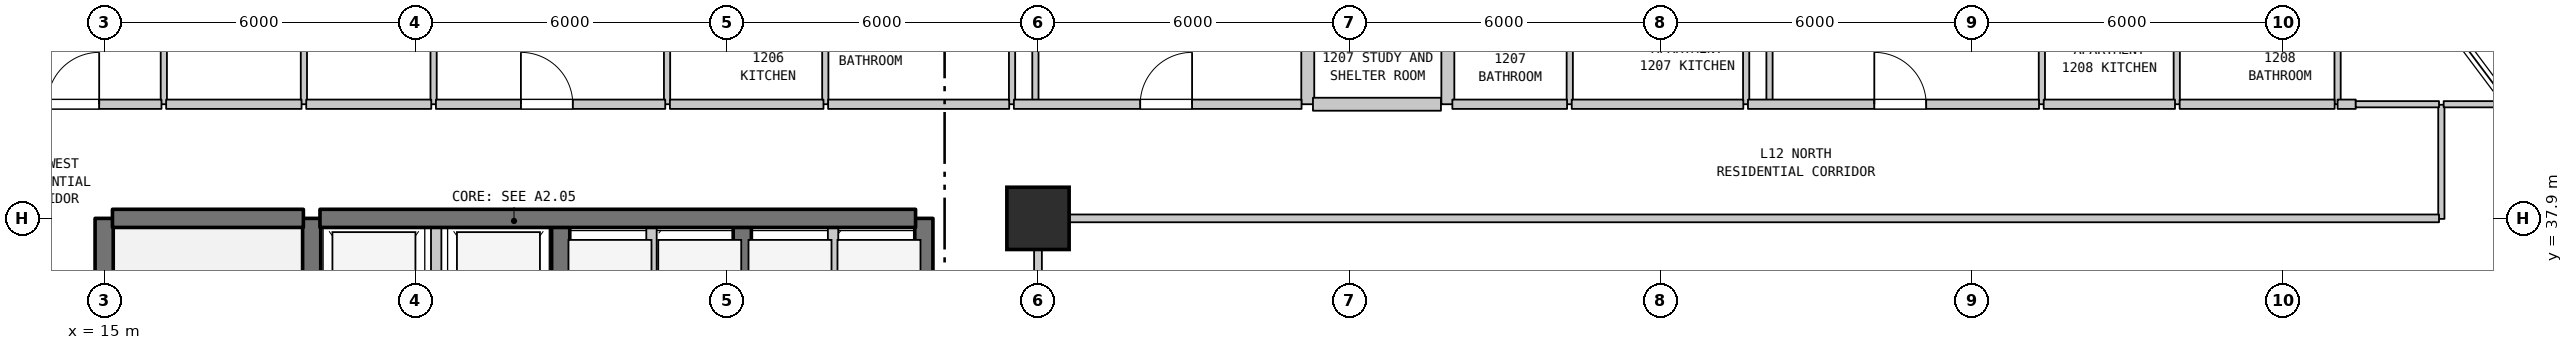
"""IFC4 building model, lengths in metres.
Left out: names, types, materials, properties, quantities, classifications, styles, units other than length and angle.
Written with IfcOpenShell. Run it as: python <this file> out.ifc"""

import sys

from ifc_helpers import new_model, si_unit, direction, frame, frame_2d, origin, origin_2d, place, context, subcontext, project, spatial, rectangle, extrude, element, fill, save


model = new_model("IFC4")
c1 = context("Model", 3, precision=1e-05, world=origin(), true_north=direction((0.0, 1.0)))
c2 = subcontext(c1, "Body", "Model", "MODEL_VIEW")
j1 = project(units=[si_unit("LENGTHUNIT", "METRE"), si_unit("PLANEANGLEUNIT", "RADIAN")], contexts=[c1])
p1 = place(None, origin())
s1 = spatial("IfcSite", under=j1, at=p1, CompositionType="ELEMENT")
p2 = place(p1, origin())
s2 = spatial("IfcBuilding", under=s1, at=p2, CompositionType="ELEMENT")
p3 = place(p2, frame((0.0, 0.0, 53.6)))
s3 = spatial("IfcBuildingStorey", under=s2, at=p3, CompositionType="ELEMENT", Elevation=53.6)
p4 = place(p3, frame((33.0, 37.9, 0.0), z_axis=(0.0, 0.0, 1.0), x_axis=(1.0, 0.0, 0.0)))
e1 = element("IfcColumn", 1, at=p4, inside=s3, PredefinedType="COLUMN", context=c2, shape_type="SweptSolid", body=[
    extrude(rectangle(XDim=1.2, YDim=1.2, at=origin_2d()), origin(), (0.0, 0.0, 1.0), 3.7),
])
p5 = place(p3, frame((15.0, 31.1, 0.0), z_axis=(0.0, 0.0, 1.0), x_axis=(0.0, 1.0, 0.0)))
e2 = element("IfcWall", 2, at=p5, inside=s3, PredefinedType="SHEAR", context=c2, shape_type="SweptSolid", body=[
    extrude(rectangle(XDim=6.8, YDim=0.35, at=frame_2d((3.4, 0.0))), origin(), (0.0, 0.0, 1.0), 3.385),
])
p6 = place(p3, frame((16.15, 40.1, 0.0), z_axis=(0.0, 0.0, 1.0), x_axis=(0.0, 1.0, 0.0)))
e3 = element("IfcWall", 3, at=p6, inside=s3, PredefinedType="PARTITIONING", context=c2, shape_type="SweptSolid", body=[
    extrude(rectangle(XDim=3.2, YDim=0.12, at=frame_2d((1.6, 0.0))), origin(), (0.0, 0.0, 1.0), 3.385),
])
p7 = place(p3, frame((18.85, 40.1, 0.0), z_axis=(0.0, 0.0, 1.0), x_axis=(0.0, 1.0, 0.0)))
e4 = element("IfcWall", 4, at=p7, inside=s3, PredefinedType="PARTITIONING", context=c2, shape_type="SweptSolid", body=[
    extrude(rectangle(XDim=3.2, YDim=0.12, at=frame_2d((1.6, 0.0))), origin(), (0.0, 0.0, 1.0), 3.385),
])
p8 = place(p7, frame((1.15, 0.0, 0.0)))
e5 = element("IfcOpeningElement", 5, at=p8, cuts=e4, PredefinedType="OPENING", context=c2, shape_type="SweptSolid", body=[
    extrude(rectangle(XDim=0.9, YDim=2.15, at=frame_2d((0.45, 1.075))), frame((0.0, 0.07, 0.0), z_axis=(0.0, -1.0, 0.0), x_axis=(1.0, 0.0, 0.0)), (0.0, 0.0, 1.0), 0.14),
])
p9 = place(p3, frame((19.0, 35.0, 0.0), z_axis=(0.0, 0.0, 1.0), x_axis=(0.0, 1.0, 0.0)))
e6 = element("IfcWall", 6, at=p9, inside=s3, PredefinedType="SHEAR", context=c2, shape_type="SweptSolid", body=[
    extrude(rectangle(XDim=2.9, YDim=0.35, at=frame_2d((1.45, 0.0))), origin(), (0.0, 0.0, 1.0), 3.385),
])
p10 = place(p3, frame((21.35, 40.1, 0.0), z_axis=(0.0, 0.0, 1.0), x_axis=(0.0, 1.0, 0.0)))
e7 = element("IfcWall", 7, at=p10, inside=s3, PredefinedType="PARTITIONING", context=c2, shape_type="SweptSolid", body=[
    extrude(rectangle(XDim=13.79, YDim=0.12, at=frame_2d((6.895, 0.0))), origin(), (0.0, 0.0, 1.0), 3.385),
])
p11 = place(p3, frame((21.4, 35.0, 0.0), z_axis=(0.0, 0.0, 1.0), x_axis=(0.0, 1.0, 0.0)))
e8 = element("IfcWall", 8, at=p11, inside=s3, PredefinedType="STANDARD", context=c2, shape_type="SweptSolid", body=[
    extrude(rectangle(XDim=2.9, YDim=0.2, at=frame_2d((1.45, 0.0))), origin(), (0.0, 0.0, 1.0), 3.385),
])
p12 = place(p3, frame((23.8, 35.0, 0.0), z_axis=(0.0, 0.0, 1.0), x_axis=(0.0, 1.0, 0.0)))
e9 = element("IfcWall", 9, at=p12, inside=s3, PredefinedType="SHEAR", context=c2, shape_type="SweptSolid", body=[
    extrude(rectangle(XDim=2.9, YDim=0.35, at=frame_2d((1.45, 0.0))), origin(), (0.0, 0.0, 1.0), 3.385),
])
p13 = place(p3, frame((25.55, 35.0, 0.0), z_axis=(0.0, 0.0, 1.0), x_axis=(0.0, 1.0, 0.0)))
e10 = element("IfcWall", 10, at=p13, inside=s3, PredefinedType="STANDARD", context=c2, shape_type="SweptSolid", body=[
    extrude(rectangle(XDim=2.9, YDim=0.2, at=frame_2d((1.45, 0.0))), origin(), (0.0, 0.0, 1.0), 3.385),
])
p14 = place(p3, frame((25.85, 40.1, 0.0), z_axis=(0.0, 0.0, 1.0), x_axis=(0.0, 1.0, 0.0)))
e11 = element("IfcWall", 11, at=p14, inside=s3, PredefinedType="PARTITIONING", context=c2, shape_type="SweptSolid", body=[
    extrude(rectangle(XDim=2.3, YDim=0.12, at=frame_2d((1.15, 0.0))), origin(), (0.0, 0.0, 1.0), 3.385),
])
p15 = place(p3, frame((27.3, 35.0, 0.0), z_axis=(0.0, 0.0, 1.0), x_axis=(0.0, 1.0, 0.0)))
e12 = element("IfcWall", 12, at=p15, inside=s3, PredefinedType="SHEAR", context=c2, shape_type="SweptSolid", body=[
    extrude(rectangle(XDim=2.9, YDim=0.35, at=frame_2d((1.45, 0.0))), origin(), (0.0, 0.0, 1.0), 3.385),
])
p16 = place(p3, frame((28.9, 40.1, 0.0), z_axis=(0.0, 0.0, 1.0), x_axis=(0.0, 1.0, 0.0)))
e13 = element("IfcWall", 13, at=p16, inside=s3, PredefinedType="PARTITIONING", context=c2, shape_type="SweptSolid", body=[
    extrude(rectangle(XDim=2.3, YDim=0.12, at=frame_2d((1.15, 0.0))), origin(), (0.0, 0.0, 1.0), 3.385),
])
p17 = place(p3, frame((29.05, 35.0, 0.0), z_axis=(0.0, 0.0, 1.0), x_axis=(0.0, 1.0, 0.0)))
e14 = element("IfcWall", 14, at=p17, inside=s3, PredefinedType="STANDARD", context=c2, shape_type="SweptSolid", body=[
    extrude(rectangle(XDim=2.9, YDim=0.2, at=frame_2d((1.45, 0.0))), origin(), (0.0, 0.0, 1.0), 3.385),
])
p18 = place(p3, frame((30.8, 35.0, 0.0), z_axis=(0.0, 0.0, 1.0), x_axis=(0.0, 1.0, 0.0)))
e15 = element("IfcWall", 15, at=p18, inside=s3, PredefinedType="SHEAR", context=c2, shape_type="SweptSolid", body=[
    extrude(rectangle(XDim=2.9, YDim=0.35, at=frame_2d((1.45, 0.0))), origin(), (0.0, 0.0, 1.0), 3.385),
])
p19 = place(p3, frame((32.5, 40.1, 0.0), z_axis=(0.0, 0.0, 1.0), x_axis=(0.0, 1.0, 0.0)))
e16 = element("IfcWall", 16, at=p19, inside=s3, PredefinedType="PARTITIONING", context=c2, shape_type="SweptSolid", body=[
    extrude(rectangle(XDim=2.3, YDim=0.12, at=frame_2d((1.15, 0.0))), origin(), (0.0, 0.0, 1.0), 3.385),
])
p20 = place(p3, frame((32.95, 40.1, 0.0), z_axis=(0.0, 0.0, 1.0), x_axis=(0.0, 1.0, 0.0)))
e17 = element("IfcWall", 17, at=p20, inside=s3, PredefinedType="PARTITIONING", context=c2, shape_type="SweptSolid", body=[
    extrude(rectangle(XDim=2.05, YDim=0.12, at=frame_2d((1.025, 0.0))), origin(), (0.0, 0.0, 1.0), 2.785),
])
p21 = place(p3, frame((33.0, 27.91, 0.0), z_axis=(0.0, 0.0, 1.0), x_axis=(0.0, 1.0, 0.0)))
e18 = element("IfcWall", 18, at=p21, inside=s3, PredefinedType="STANDARD", context=c2, shape_type="SweptSolid", body=[
    extrude(rectangle(XDim=9.98, YDim=0.15, at=frame_2d((4.99, 0.0))), origin(), (0.0, 0.0, 1.0), 2.885),
])
for number, where, z_axis, x_axis in (
    (19, (38.2, 40.1, 0.0), (0.0, 0.0, 1.0), (0.0, 1.0, 0.0)),
    (20, (40.9, 40.1, 0.0), (0.0, 0.0, 1.0), (0.0, 1.0, 0.0)),
):
    element("IfcWall", number, at=place(p3, frame(where, z_axis=z_axis, x_axis=x_axis)), inside=s3, PredefinedType="STANDARD", context=c2, shape_type="SweptSolid", body=[
        extrude(rectangle(XDim=2.3, YDim=0.25, at=frame_2d((1.15, 0.0))), origin(), (0.0, 0.0, 1.0), 3.385),
    ])
for number, where, z_axis, x_axis in (
    (21, (43.25, 40.1, 0.0), (0.0, 0.0, 1.0), (0.0, 1.0, 0.0)),
    (22, (46.65, 40.1, 0.0), (0.0, 0.0, 1.0), (0.0, 1.0, 0.0)),
):
    element("IfcWall", number, at=place(p3, frame(where, z_axis=z_axis, x_axis=x_axis)), inside=s3, PredefinedType="PARTITIONING", context=c2, shape_type="SweptSolid", body=[
        extrude(rectangle(XDim=2.3, YDim=0.12, at=frame_2d((1.15, 0.0))), origin(), (0.0, 0.0, 1.0), 3.385),
    ])
p22 = place(p3, frame((47.1, 40.1, 0.0), z_axis=(0.0, 0.0, 1.0), x_axis=(0.0, 1.0, 0.0)))
e23 = element("IfcWall", 23, at=p22, inside=s3, PredefinedType="PARTITIONING", context=c2, shape_type="SweptSolid", body=[
    extrude(rectangle(XDim=2.05, YDim=0.12, at=frame_2d((1.025, 0.0))), origin(), (0.0, 0.0, 1.0), 3.385),
])
for number, where, z_axis, x_axis in (
    (24, (52.35, 40.1, 0.0), (0.0, 0.0, 1.0), (0.0, 1.0, 0.0)),
    (25, (54.95, 40.1, 0.0), (0.0, 0.0, 1.0), (0.0, 1.0, 0.0)),
    (26, (58.05, 40.1, 0.0), (0.0, 0.0, 1.0), (0.0, 1.0, 0.0)),
):
    element("IfcWall", number, at=place(p3, frame(where, z_axis=z_axis, x_axis=x_axis)), inside=s3, PredefinedType="PARTITIONING", context=c2, shape_type="SweptSolid", body=[
        extrude(rectangle(XDim=2.3, YDim=0.12, at=frame_2d((1.15, 0.0))), origin(), (0.0, 0.0, 1.0), 3.385),
    ])
p23 = place(p3, frame((60.05, 37.89, 0.0), z_axis=(0.0, 0.0, 1.0), x_axis=(0.0, 1.0, 0.0)))
e27 = element("IfcWall", 27, at=p23, inside=s3, PredefinedType="PARTITIONING", context=c2, shape_type="SweptSolid", body=[
    extrude(rectangle(XDim=2.2, YDim=0.12, at=frame_2d((1.1, 0.0))), origin(), (0.0, 0.0, 1.0), 3.385),
])
p24 = place(p3, frame((15.16, 37.9, 0.0), z_axis=(0.0, 0.0, 1.0), x_axis=(1.0, 0.0, 0.0)))
e28 = element("IfcWall", 28, at=p24, inside=s3, PredefinedType="SHEAR", context=c2, shape_type="SweptSolid", body=[
    extrude(rectangle(XDim=3.68, YDim=0.35, at=frame_2d((1.84, 0.0))), origin(), (0.0, 0.0, 1.0), 3.385),
])
p25 = place(p3, frame((19.16, 37.9, 0.0), z_axis=(0.0, 0.0, 1.0), x_axis=(1.0, 0.0, 0.0)))
e29 = element("IfcWall", 29, at=p25, inside=s3, PredefinedType="SHEAR", context=c2, shape_type="SweptSolid", body=[
    extrude(rectangle(XDim=11.48, YDim=0.35, at=frame_2d((5.74, 0.0))), origin(), (0.0, 0.0, 1.0), 3.385),
])
p26 = place(p3, frame((33.07, 37.9, 0.0), z_axis=(0.0, 0.0, 1.0), x_axis=(1.0, 0.0, 0.0)))
e30 = element("IfcWall", 30, at=p26, inside=s3, PredefinedType="STANDARD", context=c2, shape_type="SweptSolid", body=[
    extrude(rectangle(XDim=26.935, YDim=0.15, at=frame_2d((13.467, 0.0))), origin(), (0.0, 0.0, 1.0), 3.385),
])
p27 = place(p3, frame((12.875, 40.1, 0.0), z_axis=(0.0, 0.0, 1.0), x_axis=(1.0, 0.0, 0.0)))
e31 = element("IfcWall", 31, at=p27, inside=s3, PredefinedType="STANDARD", context=c2, shape_type="SweptSolid", body=[
    extrude(rectangle(XDim=3.23, YDim=0.18, at=frame_2d((1.615, 0.0))), origin(), (0.0, 0.0, 1.0), 3.385),
])
p28 = place(p27, frame((1.029, 0.0, 0.0)))
e32 = element("IfcOpeningElement", 32, at=p28, cuts=e31, PredefinedType="OPENING", context=c2, shape_type="SweptSolid", body=[
    extrude(rectangle(XDim=1.0, YDim=2.15, at=frame_2d((0.5, 1.075))), frame((0.0, 0.1, 0.0), z_axis=(0.0, -1.0, 0.0), x_axis=(1.0, 0.0, 0.0)), (0.0, 0.0, 1.0), 0.2),
])
p29 = place(p3, frame((16.195, 40.1, 0.0), z_axis=(0.0, 0.0, 1.0), x_axis=(1.0, 0.0, 0.0)))
e33 = element("IfcWall", 33, at=p29, inside=s3, PredefinedType="STANDARD", context=c2, shape_type="SweptSolid", body=[
    extrude(rectangle(XDim=2.61, YDim=0.18, at=frame_2d((1.305, 0.0))), origin(), (0.0, 0.0, 1.0), 3.385),
])
p30 = place(p3, frame((18.895, 40.1, 0.0), z_axis=(0.0, 0.0, 1.0), x_axis=(1.0, 0.0, 0.0)))
e34 = element("IfcWall", 34, at=p30, inside=s3, PredefinedType="STANDARD", context=c2, shape_type="SweptSolid", body=[
    extrude(rectangle(XDim=2.41, YDim=0.18, at=frame_2d((1.205, 0.0))), origin(), (0.0, 0.0, 1.0), 3.385),
])
p31 = place(p3, frame((21.395, 40.1, 0.0), z_axis=(0.0, 0.0, 1.0), x_axis=(1.0, 0.0, 0.0)))
e35 = element("IfcWall", 35, at=p31, inside=s3, PredefinedType="STANDARD", context=c2, shape_type="SweptSolid", body=[
    extrude(rectangle(XDim=4.42, YDim=0.18, at=frame_2d((2.21, 0.0))), origin(), (0.0, 0.0, 1.0), 3.385),
])
p32 = place(p31, frame((1.638, 0.0, 0.0)))
e36 = element("IfcOpeningElement", 36, at=p32, cuts=e35, PredefinedType="OPENING", context=c2, shape_type="SweptSolid", body=[
    extrude(rectangle(XDim=1.0, YDim=2.15, at=frame_2d((0.5, 1.075))), frame((0.0, 0.1, 0.0), z_axis=(0.0, -1.0, 0.0), x_axis=(1.0, 0.0, 0.0)), (0.0, 0.0, 1.0), 0.2),
])
p33 = place(p3, frame((25.905, 40.1, 0.0), z_axis=(0.0, 0.0, 1.0), x_axis=(1.0, 0.0, 0.0)))
e37 = element("IfcWall", 37, at=p33, inside=s3, PredefinedType="STANDARD", context=c2, shape_type="SweptSolid", body=[
    extrude(rectangle(XDim=2.96, YDim=0.18, at=frame_2d((1.48, 0.0))), origin(), (0.0, 0.0, 1.0), 3.385),
])
p34 = place(p3, frame((28.955, 40.1, 0.0), z_axis=(0.0, 0.0, 1.0), x_axis=(1.0, 0.0, 0.0)))
e38 = element("IfcWall", 38, at=p34, inside=s3, PredefinedType="STANDARD", context=c2, shape_type="SweptSolid", body=[
    extrude(rectangle(XDim=3.49, YDim=0.18, at=frame_2d((1.745, 0.0))), origin(), (0.0, 0.0, 1.0), 3.385),
])
p35 = place(p3, frame((32.535, 40.1, 0.0), z_axis=(0.0, 0.0, 1.0), x_axis=(1.0, 0.0, 0.0)))
e39 = element("IfcWall", 39, at=p35, inside=s3, PredefinedType="STANDARD", context=c2, shape_type="SweptSolid", body=[
    extrude(rectangle(XDim=5.545, YDim=0.18, at=frame_2d((2.772, 0.0))), origin(), (0.0, 0.0, 1.0), 3.385),
])
p36 = place(p35, frame((2.435, 0.0, 0.0)))
e40 = element("IfcOpeningElement", 40, at=p36, cuts=e39, PredefinedType="OPENING", context=c2, shape_type="SweptSolid", body=[
    extrude(rectangle(XDim=1.0, YDim=2.15, at=frame_2d((0.5, 1.075))), frame((0.0, 0.1, 0.0), z_axis=(0.0, -1.0, 0.0), x_axis=(1.0, 0.0, 0.0)), (0.0, 0.0, 1.0), 0.2),
])
p37 = place(p3, frame((38.3, 40.1, 0.0), z_axis=(0.0, 0.0, 1.0), x_axis=(1.0, 0.0, 0.0)))
e41 = element("IfcWall", 41, at=p37, inside=s3, PredefinedType="STANDARD", context=c2, shape_type="SweptSolid", body=[
    extrude(rectangle(XDim=2.467, YDim=0.25, at=frame_2d((1.233, 0.0))), origin(), (0.0, 0.0, 1.0), 3.385),
])
p38 = place(p3, frame((40.987, 40.1, 0.0), z_axis=(0.0, 0.0, 1.0), x_axis=(1.0, 0.0, 0.0)))
e42 = element("IfcWall", 42, at=p38, inside=s3, PredefinedType="STANDARD", context=c2, shape_type="SweptSolid", body=[
    extrude(rectangle(XDim=2.211, YDim=0.18, at=frame_2d((1.105, 0.0))), origin(), (0.0, 0.0, 1.0), 3.385),
])
p39 = place(p3, frame((43.288, 40.1, 0.0), z_axis=(0.0, 0.0, 1.0), x_axis=(1.0, 0.0, 0.0)))
e43 = element("IfcWall", 43, at=p39, inside=s3, PredefinedType="STANDARD", context=c2, shape_type="SweptSolid", body=[
    extrude(rectangle(XDim=3.307, YDim=0.18, at=frame_2d((1.653, 0.0))), origin(), (0.0, 0.0, 1.0), 3.385),
])
p40 = place(p3, frame((46.685, 40.1, 0.0), z_axis=(0.0, 0.0, 1.0), x_axis=(1.0, 0.0, 0.0)))
e44 = element("IfcWall", 44, at=p40, inside=s3, PredefinedType="STANDARD", context=c2, shape_type="SweptSolid", body=[
    extrude(rectangle(XDim=5.61, YDim=0.18, at=frame_2d((2.805, 0.0))), origin(), (0.0, 0.0, 1.0), 3.385),
])
p41 = place(p40, frame((2.435, 0.0, 0.0)))
e45 = element("IfcOpeningElement", 45, at=p41, cuts=e44, PredefinedType="OPENING", context=c2, shape_type="SweptSolid", body=[
    extrude(rectangle(XDim=1.0, YDim=2.15, at=frame_2d((0.5, 1.075))), frame((0.0, 0.1, 0.0), z_axis=(0.0, -1.0, 0.0), x_axis=(1.0, 0.0, 0.0)), (0.0, 0.0, 1.0), 0.2),
])
p42 = place(p3, frame((52.385, 40.1, 0.0), z_axis=(0.0, 0.0, 1.0), x_axis=(1.0, 0.0, 0.0)))
e46 = element("IfcWall", 46, at=p42, inside=s3, PredefinedType="STANDARD", context=c2, shape_type="SweptSolid", body=[
    extrude(rectangle(XDim=2.531, YDim=0.18, at=frame_2d((1.266, 0.0))), origin(), (0.0, 0.0, 1.0), 3.385),
])
p43 = place(p3, frame((55.006, 40.1, 0.0), z_axis=(0.0, 0.0, 1.0), x_axis=(1.0, 0.0, 0.0)))
e47 = element("IfcWall", 47, at=p43, inside=s3, PredefinedType="STANDARD", context=c2, shape_type="SweptSolid", body=[
    extrude(rectangle(XDim=2.987, YDim=0.18, at=frame_2d((1.493, 0.0))), origin(), (0.0, 0.0, 1.0), 3.385),
])
p44 = place(p3, frame((58.05, 40.1, 0.0), z_axis=(0.0, 0.0, 1.0), x_axis=(1.0, 0.0, 0.0)))
e48 = element("IfcWall", 48, at=p44, inside=s3, PredefinedType="STANDARD", context=c2, shape_type="SweptSolid", body=[
    extrude(rectangle(XDim=0.35, YDim=0.18, at=frame_2d((0.175, 0.0))), origin(), (0.0, 0.0, 1.0), 3.385),
])
p45 = place(p3, frame((58.4, 40.1, 0.0), z_axis=(0.0, 0.0, 1.0), x_axis=(1.0, 0.0, 0.0)))
e49 = element("IfcWall", 49, at=p45, inside=s3, PredefinedType="PARTITIONING", context=c2, shape_type="SweptSolid", body=[
    extrude(rectangle(XDim=1.605, YDim=0.12, at=frame_2d((0.802, 0.0))), origin(), (0.0, 0.0, 1.0), 3.385),
])
p46 = place(p3, frame((60.095, 40.1, 0.0), z_axis=(0.0, 0.0, 1.0), x_axis=(1.0, 0.0, 0.0)))
e50 = element("IfcWall", 50, at=p46, inside=s3, PredefinedType="PARTITIONING", context=c2, shape_type="SweptSolid", body=[
    extrude(rectangle(XDim=1.245, YDim=0.12, at=frame_2d((0.623, 0.0))), origin(), (0.0, 0.0, 1.0), 3.385),
])
p47 = place(p28, origin())
e51 = element("IfcDoor", 51, at=p47, inside=s3, OperationType="SINGLE_SWING_RIGHT", PredefinedType="DOOR", context=c2, shape_type="SweptSolid", body=[
    extrude(rectangle(XDim=1.0, YDim=2.15, at=frame_2d((0.5, 1.075))), frame((0.0, 0.025, 0.0), z_axis=(0.0, -1.0, 0.0), x_axis=(1.0, 0.0, 0.0)), (0.0, 0.0, 1.0), 0.05),
])
fill(e32, e51)
p48 = place(p32, origin())
e52 = element("IfcDoor", 52, at=p48, inside=s3, OperationType="SINGLE_SWING_LEFT", PredefinedType="DOOR", context=c2, shape_type="SweptSolid", body=[
    extrude(rectangle(XDim=1.0, YDim=2.15, at=frame_2d((0.5, 1.075))), frame((0.0, 0.025, 0.0), z_axis=(0.0, -1.0, 0.0), x_axis=(1.0, 0.0, 0.0)), (0.0, 0.0, 1.0), 0.05),
])
fill(e36, e52)
p49 = place(p36, origin())
e53 = element("IfcDoor", 53, at=p49, inside=s3, OperationType="SINGLE_SWING_RIGHT", PredefinedType="DOOR", context=c2, shape_type="SweptSolid", body=[
    extrude(rectangle(XDim=1.0, YDim=2.15, at=frame_2d((0.5, 1.075))), frame((0.0, 0.025, 0.0), z_axis=(0.0, -1.0, 0.0), x_axis=(1.0, 0.0, 0.0)), (0.0, 0.0, 1.0), 0.05),
])
fill(e40, e53)
p50 = place(p41, origin())
e54 = element("IfcDoor", 54, at=p50, inside=s3, OperationType="SINGLE_SWING_LEFT", PredefinedType="DOOR", context=c2, shape_type="SweptSolid", body=[
    extrude(rectangle(XDim=1.0, YDim=2.15, at=frame_2d((0.5, 1.075))), frame((0.0, 0.025, 0.0), z_axis=(0.0, -1.0, 0.0), x_axis=(1.0, 0.0, 0.0)), (0.0, 0.0, 1.0), 0.05),
])
fill(e45, e54)
save(model, sys.argv[1])
